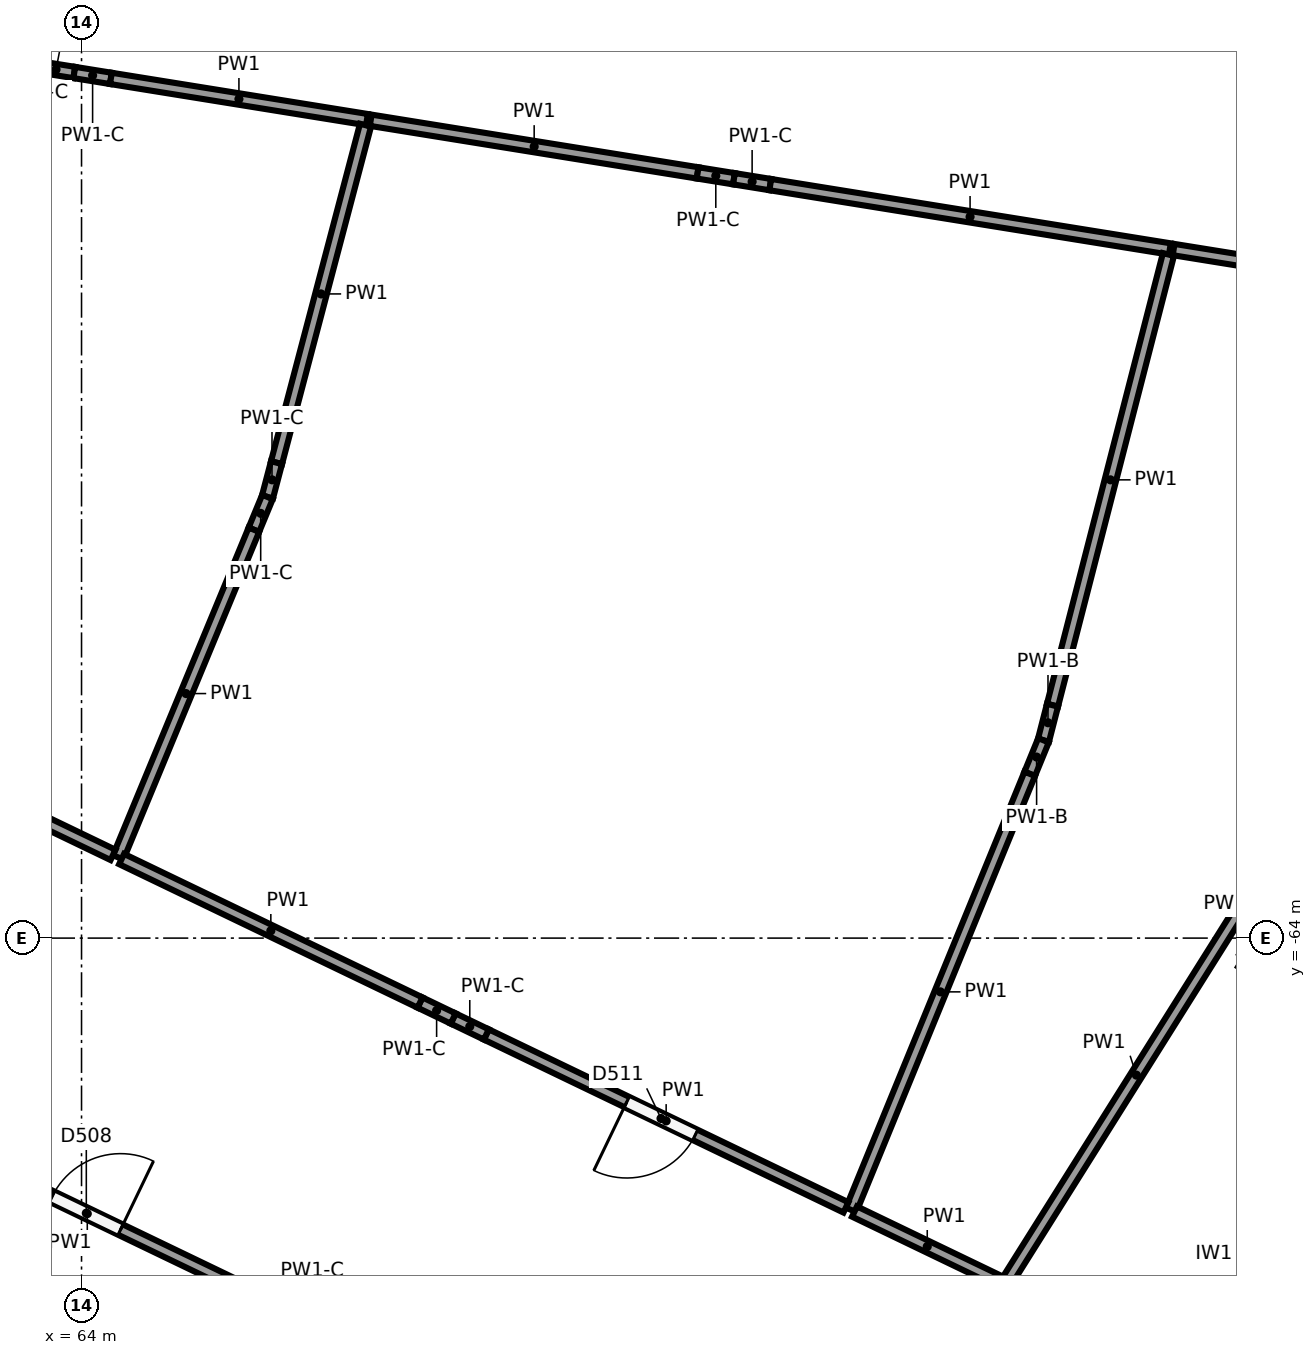
"""IFC4 building model, lengths in metres.
Left out: names, types, materials, properties, quantities, classifications, styles, units other than length and angle.
Written with IfcOpenShell. Run it as: python <this file> out.ifc"""

import sys

from ifc_helpers import new_model, si_unit, direction, frame, frame_2d, origin, origin_2d, place, context, subcontext, project, spatial, rectangle, circle, extrude, element, fill, save


model = new_model("IFC4")
c1 = context("Model", 3, precision=1e-05, world=origin(), true_north=direction((0.0, 1.0)))
c2 = subcontext(c1, "Body", "Model", "MODEL_VIEW")
j1 = project(units=[si_unit("LENGTHUNIT", "METRE"), si_unit("PLANEANGLEUNIT", "RADIAN")], contexts=[c1])
p1 = place(None, origin())
s1 = spatial("IfcSite", under=j1, at=p1, CompositionType="ELEMENT")
p2 = place(p1, origin())
s2 = spatial("IfcBuilding", under=s1, at=p2, CompositionType="ELEMENT")
p3 = place(p2, frame((0.0, 0.0, -4.0)))
s3 = spatial("IfcBuildingStorey", under=s2, at=p3, CompositionType="ELEMENT", Elevation=-4.0)
for number, where, z_axis, x_axis in (
    (1, (67.972, -67.058, -0.4), (0.0, 0.0, 1.0), (1.0, 0.0, 0.0)),
    (2, (71.17, -59.677, -0.4), (0.0, 0.0, 1.0), (1.0, 0.0, 0.0)),
):
    element("IfcColumn", number, at=place(p3, frame(where, z_axis=z_axis, x_axis=x_axis)), inside=s3, PredefinedType="COLUMN", context=c2, shape_type="SweptSolid", body=[
        extrude(circle(Radius=0.45, at=origin_2d()), origin(), (0.0, 0.0, 1.0), 4.4),
    ])
p4 = place(p3, frame((78.819, -69.381, -1.2), z_axis=(0.0, 0.0, 1.0), x_axis=(0.532018892235, 0.846732483318, 0.0)))
e3 = element("IfcWall", 3, at=p4, inside=s3, PredefinedType="SHEAR", context=c2, shape_type="SweptSolid", body=[
    extrude(rectangle(XDim=1.9, YDim=0.2, at=frame_2d((0.95, 0.0))), origin(), (0.0, 0.0, 1.0), 4.8),
])
p5 = place(p4, frame((0.4, 0.0, 1.2)))
e4 = element("IfcOpeningElement", 4, at=p5, cuts=e3, PredefinedType="OPENING", context=c2, shape_type="SweptSolid", body=[
    extrude(rectangle(XDim=1.1, YDim=2.1, at=frame_2d((0.55, 1.05))), frame((0.0, 0.11, 0.0), z_axis=(0.0, -1.0, 0.0), x_axis=(1.0, 0.0, 0.0)), (0.0, 0.0, 1.0), 0.22),
])
p6 = place(p3, frame((62.08, -66.665, 0.0), z_axis=(0.0, 0.0, 1.0), x_axis=(0.901190728749, -0.433422738694, 0.0)))
e5 = element("IfcWall", 5, at=p6, inside=s3, PredefinedType="PARTITIONING", context=c2, shape_type="SweptSolid", body=[
    extrude(rectangle(XDim=4.428, YDim=0.15, at=frame_2d((2.214, 0.0))), origin(), (0.0, 0.0, 1.0), 3.6),
])
p7 = place(p6, frame((1.7, 0.0, 0.0)))
e6 = element("IfcOpeningElement", 6, at=p7, cuts=e5, PredefinedType="OPENING", context=c2, shape_type="SweptSolid", body=[
    extrude(rectangle(XDim=1.0, YDim=2.1, at=frame_2d((0.5, 1.05))), frame((0.0, 0.085, 0.0), z_axis=(0.0, -1.0, 0.0), x_axis=(1.0, 0.0, 0.0)), (0.0, 0.0, 1.0), 0.17),
])
p8 = place(p3, frame((63.424, -52.534, 0.0), z_axis=(0.0, 0.0, 1.0), x_axis=(0.987246197614, -0.159200958844, 0.0)))
e7 = element("IfcWall", 7, at=p8, inside=s3, PredefinedType="PARTITIONING", context=c2, shape_type="SweptSolid", body=[
    extrude(rectangle(XDim=0.488, YDim=0.15, at=frame_2d((0.244, 0.0))), origin(), (0.0, 0.0, 1.0), 2.7),
])
p9 = place(p3, frame((63.905, -52.612, 0.0), z_axis=(0.0, 0.0, 1.0), x_axis=(0.987312146687, -0.158791451294, 0.0)))
e8 = element("IfcWall", 8, at=p9, inside=s3, PredefinedType="PARTITIONING", context=c2, shape_type="SweptSolid", body=[
    extrude(rectangle(XDim=0.487, YDim=0.15, at=frame_2d((0.244, 0.0))), origin(), (0.0, 0.0, 1.0), 2.7),
])
p10 = place(p3, frame((64.386, -52.689, 0.0), z_axis=(0.0, 0.0, 1.0), x_axis=(0.987272663744, -0.15903674866, 0.0)))
e9 = element("IfcWall", 9, at=p10, inside=s3, PredefinedType="PARTITIONING", context=c2, shape_type="SweptSolid", body=[
    extrude(rectangle(XDim=3.413, YDim=0.15, at=frame_2d((1.706, 0.0))), origin(), (0.0, 0.0, 1.0), 3.6),
])
p11 = place(p3, frame((67.736, -53.305, 0.0), z_axis=(0.0, 0.0, 1.0), x_axis=(-0.254938171393, -0.96695735623, 0.0)))
e10 = element("IfcWall", 10, at=p11, inside=s3, PredefinedType="PARTITIONING", context=c2, shape_type="SweptSolid", body=[
    extrude(rectangle(XDim=4.592, YDim=0.15, at=frame_2d((2.296, 0.0))), origin(), (0.0, 0.0, 1.0), 3.6),
])
for number, where, z_axis, x_axis in (
    (11, (66.565, -57.745, 0.0), (0.0, 0.0, 1.0), (-0.255, -0.967, 0.0)),
    (12, (66.446, -58.196, 0.0), (0.0, 0.0, 1.0), (-0.382, -0.924, 0.0)),
):
    element("IfcWall", number, at=place(p3, frame(where, z_axis=z_axis, x_axis=x_axis)), inside=s3, PredefinedType="PARTITIONING", context=c2, shape_type="SweptSolid", body=[
        extrude(rectangle(XDim=0.467, YDim=0.15, at=frame_2d((0.233, 0.0))), origin(), (0.0, 0.0, 1.0), 2.7),
    ])
p12 = place(p3, frame((66.268, -58.627, 0.0), z_axis=(0.0, 0.0, 1.0), x_axis=(-0.382649092979, -0.923893755603, 0.0)))
e13 = element("IfcWall", 13, at=p12, inside=s3, PredefinedType="PARTITIONING", context=c2, shape_type="SweptSolid", body=[
    extrude(rectangle(XDim=4.666, YDim=0.15, at=frame_2d((2.333, 0.0))), origin(), (0.0, 0.0, 1.0), 3.6),
])
p13 = place(p3, frame((64.415, -62.906, 0.0), z_axis=(0.0, 0.0, 1.0), x_axis=(-0.901226054049, 0.433349281184, 0.0)))
e14 = element("IfcWall", 14, at=p13, inside=s3, PredefinedType="PARTITIONING", context=c2, shape_type="SweptSolid", body=[
    extrude(rectangle(XDim=3.337, YDim=0.15, at=frame_2d((1.669, 0.0))), origin(), (0.0, 0.0, 1.0), 3.6),
])
p14 = place(p13, frame((1.2, 0.0, 0.0)))
e15 = element("IfcOpeningElement", 15, at=p14, cuts=e14, PredefinedType="OPENING", context=c2, shape_type="SweptSolid", body=[
    extrude(rectangle(XDim=1.0, YDim=2.1, at=frame_2d((0.5, 1.05))), frame((0.0, 0.085, 0.0), z_axis=(0.0, -1.0, 0.0), x_axis=(1.0, 0.0, 0.0)), (0.0, 0.0, 1.0), 0.17),
])
p15 = place(p3, frame((67.805, -53.24, 0.0), z_axis=(0.0, 0.0, 1.0), x_axis=(0.9872743449, -0.159026311983, 0.0)))
e16 = element("IfcWall", 16, at=p15, inside=s3, PredefinedType="PARTITIONING", context=c2, shape_type="SweptSolid", body=[
    extrude(rectangle(XDim=4.357, YDim=0.15, at=frame_2d((2.178, 0.0))), origin(), (0.0, 0.0, 1.0), 3.6),
])
p16 = place(p3, frame((72.106, -53.933, 0.0), z_axis=(0.0, 0.0, 1.0), x_axis=(0.987292235335, -0.15891520395, 0.0)))
e17 = element("IfcWall", 17, at=p16, inside=s3, PredefinedType="PARTITIONING", context=c2, shape_type="SweptSolid", body=[
    extrude(rectangle(XDim=0.484, YDim=0.15, at=frame_2d((0.242, 0.0))), origin(), (0.0, 0.0, 1.0), 2.7),
])
p17 = place(p3, frame((72.584, -54.01, 0.0), z_axis=(0.0, 0.0, 1.0), x_axis=(0.987225775326, -0.159327551074, 0.0)))
e18 = element("IfcWall", 18, at=p17, inside=s3, PredefinedType="PARTITIONING", context=c2, shape_type="SweptSolid", body=[
    extrude(rectangle(XDim=0.484, YDim=0.15, at=frame_2d((0.242, 0.0))), origin(), (0.0, 0.0, 1.0), 2.7),
])
p18 = place(p3, frame((73.062, -54.087, 0.0), z_axis=(0.0, 0.0, 1.0), x_axis=(0.987277597681, -0.159006116601, 0.0)))
e19 = element("IfcWall", 19, at=p18, inside=s3, PredefinedType="PARTITIONING", context=c2, shape_type="SweptSolid", body=[
    extrude(rectangle(XDim=5.325, YDim=0.15, at=frame_2d((2.662, 0.0))), origin(), (0.0, 0.0, 1.0), 3.6),
])
p19 = place(p3, frame((78.301, -55.006, 0.0), z_axis=(0.0, 0.0, 1.0), x_axis=(-0.249144697435, -0.968466271865, 0.0)))
e20 = element("IfcWall", 20, at=p19, inside=s3, PredefinedType="PARTITIONING", context=c2, shape_type="SweptSolid", body=[
    extrude(rectangle(XDim=6.123, YDim=0.15, at=frame_2d((3.061, 0.0))), origin(), (0.0, 0.0, 1.0), 3.6),
])
p20 = place(p3, frame((76.775, -60.936, 0.0), z_axis=(0.0, 0.0, 1.0), x_axis=(-0.248917503773, -0.968524690607, 0.0)))
e21 = element("IfcWall", 21, at=p20, inside=s3, PredefinedType="PARTITIONING", context=c2, shape_type="SweptSolid", body=[
    extrude(rectangle(XDim=0.477, YDim=0.15, at=frame_2d((0.238, 0.0))), origin(), (0.0, 0.0, 1.0), 2.5),
])
p21 = place(p3, frame((76.656, -61.397, 0.0), z_axis=(0.0, 0.0, 1.0), x_axis=(-0.379230600794, -0.925302194649, 0.0)))
e22 = element("IfcWall", 22, at=p21, inside=s3, PredefinedType="PARTITIONING", context=c2, shape_type="SweptSolid", body=[
    extrude(rectangle(XDim=0.477, YDim=0.15, at=frame_2d((0.239, 0.0))), origin(), (0.0, 0.0, 1.0), 2.5),
])
p22 = place(p3, frame((76.476, -61.839, 0.0), z_axis=(0.0, 0.0, 1.0), x_axis=(-0.3791112098, -0.92535111747, 0.0)))
e23 = element("IfcWall", 23, at=p22, inside=s3, PredefinedType="PARTITIONING", context=c2, shape_type="SweptSolid", body=[
    extrude(rectangle(XDim=6.2, YDim=0.15, at=frame_2d((3.1, 0.0))), origin(), (0.0, 0.0, 1.0), 3.6),
])
p23 = place(p3, frame((74.058, -67.543, 0.0), z_axis=(0.0, 0.0, 1.0), x_axis=(-0.901194793343, 0.433414287319, 0.0)))
e24 = element("IfcWall", 24, at=p23, inside=s3, PredefinedType="PARTITIONING", context=c2, shape_type="SweptSolid", body=[
    extrude(rectangle(XDim=5.25, YDim=0.15, at=frame_2d((2.625, 0.0))), origin(), (0.0, 0.0, 1.0), 3.6),
])
p24 = place(p23, frame((2.2, 0.0, 0.0)))
e25 = element("IfcOpeningElement", 25, at=p24, cuts=e24, PredefinedType="OPENING", context=c2, shape_type="SweptSolid", body=[
    extrude(rectangle(XDim=1.0, YDim=2.1, at=frame_2d((0.5, 1.05))), frame((0.0, 0.085, 0.0), z_axis=(0.0, -1.0, 0.0), x_axis=(1.0, 0.0, 0.0)), (0.0, 0.0, 1.0), 0.17),
])
p25 = place(p3, frame((69.326, -65.268, 0.0), z_axis=(0.0, 0.0, 1.0), x_axis=(-0.901176710287, 0.433451885261, 0.0)))
e26 = element("IfcWall", 26, at=p25, inside=s3, PredefinedType="PARTITIONING", context=c2, shape_type="SweptSolid", body=[
    extrude(rectangle(XDim=0.484, YDim=0.15, at=frame_2d((0.242, 0.0))), origin(), (0.0, 0.0, 1.0), 2.7),
])
p26 = place(p3, frame((68.89, -65.058, 0.0), z_axis=(0.0, 0.0, 1.0), x_axis=(-0.901184206062, 0.433436300676, 0.0)))
e27 = element("IfcWall", 27, at=p26, inside=s3, PredefinedType="PARTITIONING", context=c2, shape_type="SweptSolid", body=[
    extrude(rectangle(XDim=0.484, YDim=0.15, at=frame_2d((0.242, 0.0))), origin(), (0.0, 0.0, 1.0), 2.7),
])
p27 = place(p3, frame((68.454, -64.848, 0.0), z_axis=(0.0, 0.0, 1.0), x_axis=(-0.901191399525, 0.433421343986, 0.0)))
e28 = element("IfcWall", 28, at=p27, inside=s3, PredefinedType="PARTITIONING", context=c2, shape_type="SweptSolid", body=[
    extrude(rectangle(XDim=4.357, YDim=0.15, at=frame_2d((2.178, 0.0))), origin(), (0.0, 0.0, 1.0), 3.6),
])
p28 = place(p3, frame((79.605, -63.055, 0.0), z_axis=(0.0, 0.0, 1.0), x_axis=(-0.532032873767, -0.846723698281, 0.0)))
e29 = element("IfcWall", 29, at=p28, inside=s3, PredefinedType="PARTITIONING", context=c2, shape_type="SweptSolid", body=[
    extrude(rectangle(XDim=6.49, YDim=0.15, at=frame_2d((3.245, 0.0))), origin(), (0.0, 0.0, 1.0), 3.6),
])
p29 = place(p3, frame((76.084, -68.518, 0.0), z_axis=(0.0, 0.0, 1.0), x_axis=(-0.901196299468, 0.433411155631, 0.0)))
e30 = element("IfcWall", 30, at=p29, inside=s3, PredefinedType="PARTITIONING", context=c2, shape_type="SweptSolid", body=[
    extrude(rectangle(XDim=2.124, YDim=0.15, at=frame_2d((1.062, 0.0))), origin(), (0.0, 0.0, 1.0), 3.6),
])
p30 = place(p3, frame((78.369, -54.941, 0.0), z_axis=(0.0, 0.0, 1.0), x_axis=(0.987271996108, -0.15904089317, 0.0)))
e31 = element("IfcWall", 31, at=p30, inside=s3, PredefinedType="PARTITIONING", context=c2, shape_type="SweptSolid", body=[
    extrude(rectangle(XDim=2.284, YDim=0.15, at=frame_2d((1.142, 0.0))), origin(), (0.0, 0.0, 1.0), 3.6),
])
p31 = place(p5, origin())
e32 = element("IfcDoor", 32, at=p31, inside=s3, OperationType="SLIDING_TO_LEFT", PredefinedType="DOOR", context=c2, shape_type="SweptSolid", body=[
    extrude(rectangle(XDim=1.1, YDim=2.1, at=frame_2d((0.55, 1.05))), frame((0.0, 0.025, 0.0), z_axis=(0.0, -1.0, 0.0), x_axis=(1.0, 0.0, 0.0)), (0.0, 0.0, 1.0), 0.05),
])
fill(e4, e32)
p32 = place(p7, origin())
e33 = element("IfcDoor", 33, at=p32, inside=s3, OperationType="SINGLE_SWING_RIGHT", PredefinedType="DOOR", context=c2, shape_type="SweptSolid", body=[
    extrude(rectangle(XDim=1.0, YDim=2.1, at=frame_2d((0.5, 1.05))), frame((0.0, 0.025, 0.0), z_axis=(0.0, -1.0, 0.0), x_axis=(1.0, 0.0, 0.0)), (0.0, 0.0, 1.0), 0.05),
])
fill(e6, e33)
p33 = place(p24, origin())
e34 = element("IfcDoor", 34, at=p33, inside=s3, OperationType="SINGLE_SWING_RIGHT", PredefinedType="DOOR", context=c2, shape_type="SweptSolid", body=[
    extrude(rectangle(XDim=1.0, YDim=2.1, at=frame_2d((0.5, 1.05))), frame((0.0, 0.025, 0.0), z_axis=(0.0, -1.0, 0.0), x_axis=(1.0, 0.0, 0.0)), (0.0, 0.0, 1.0), 0.05),
])
fill(e25, e34)
save(model, sys.argv[1])
